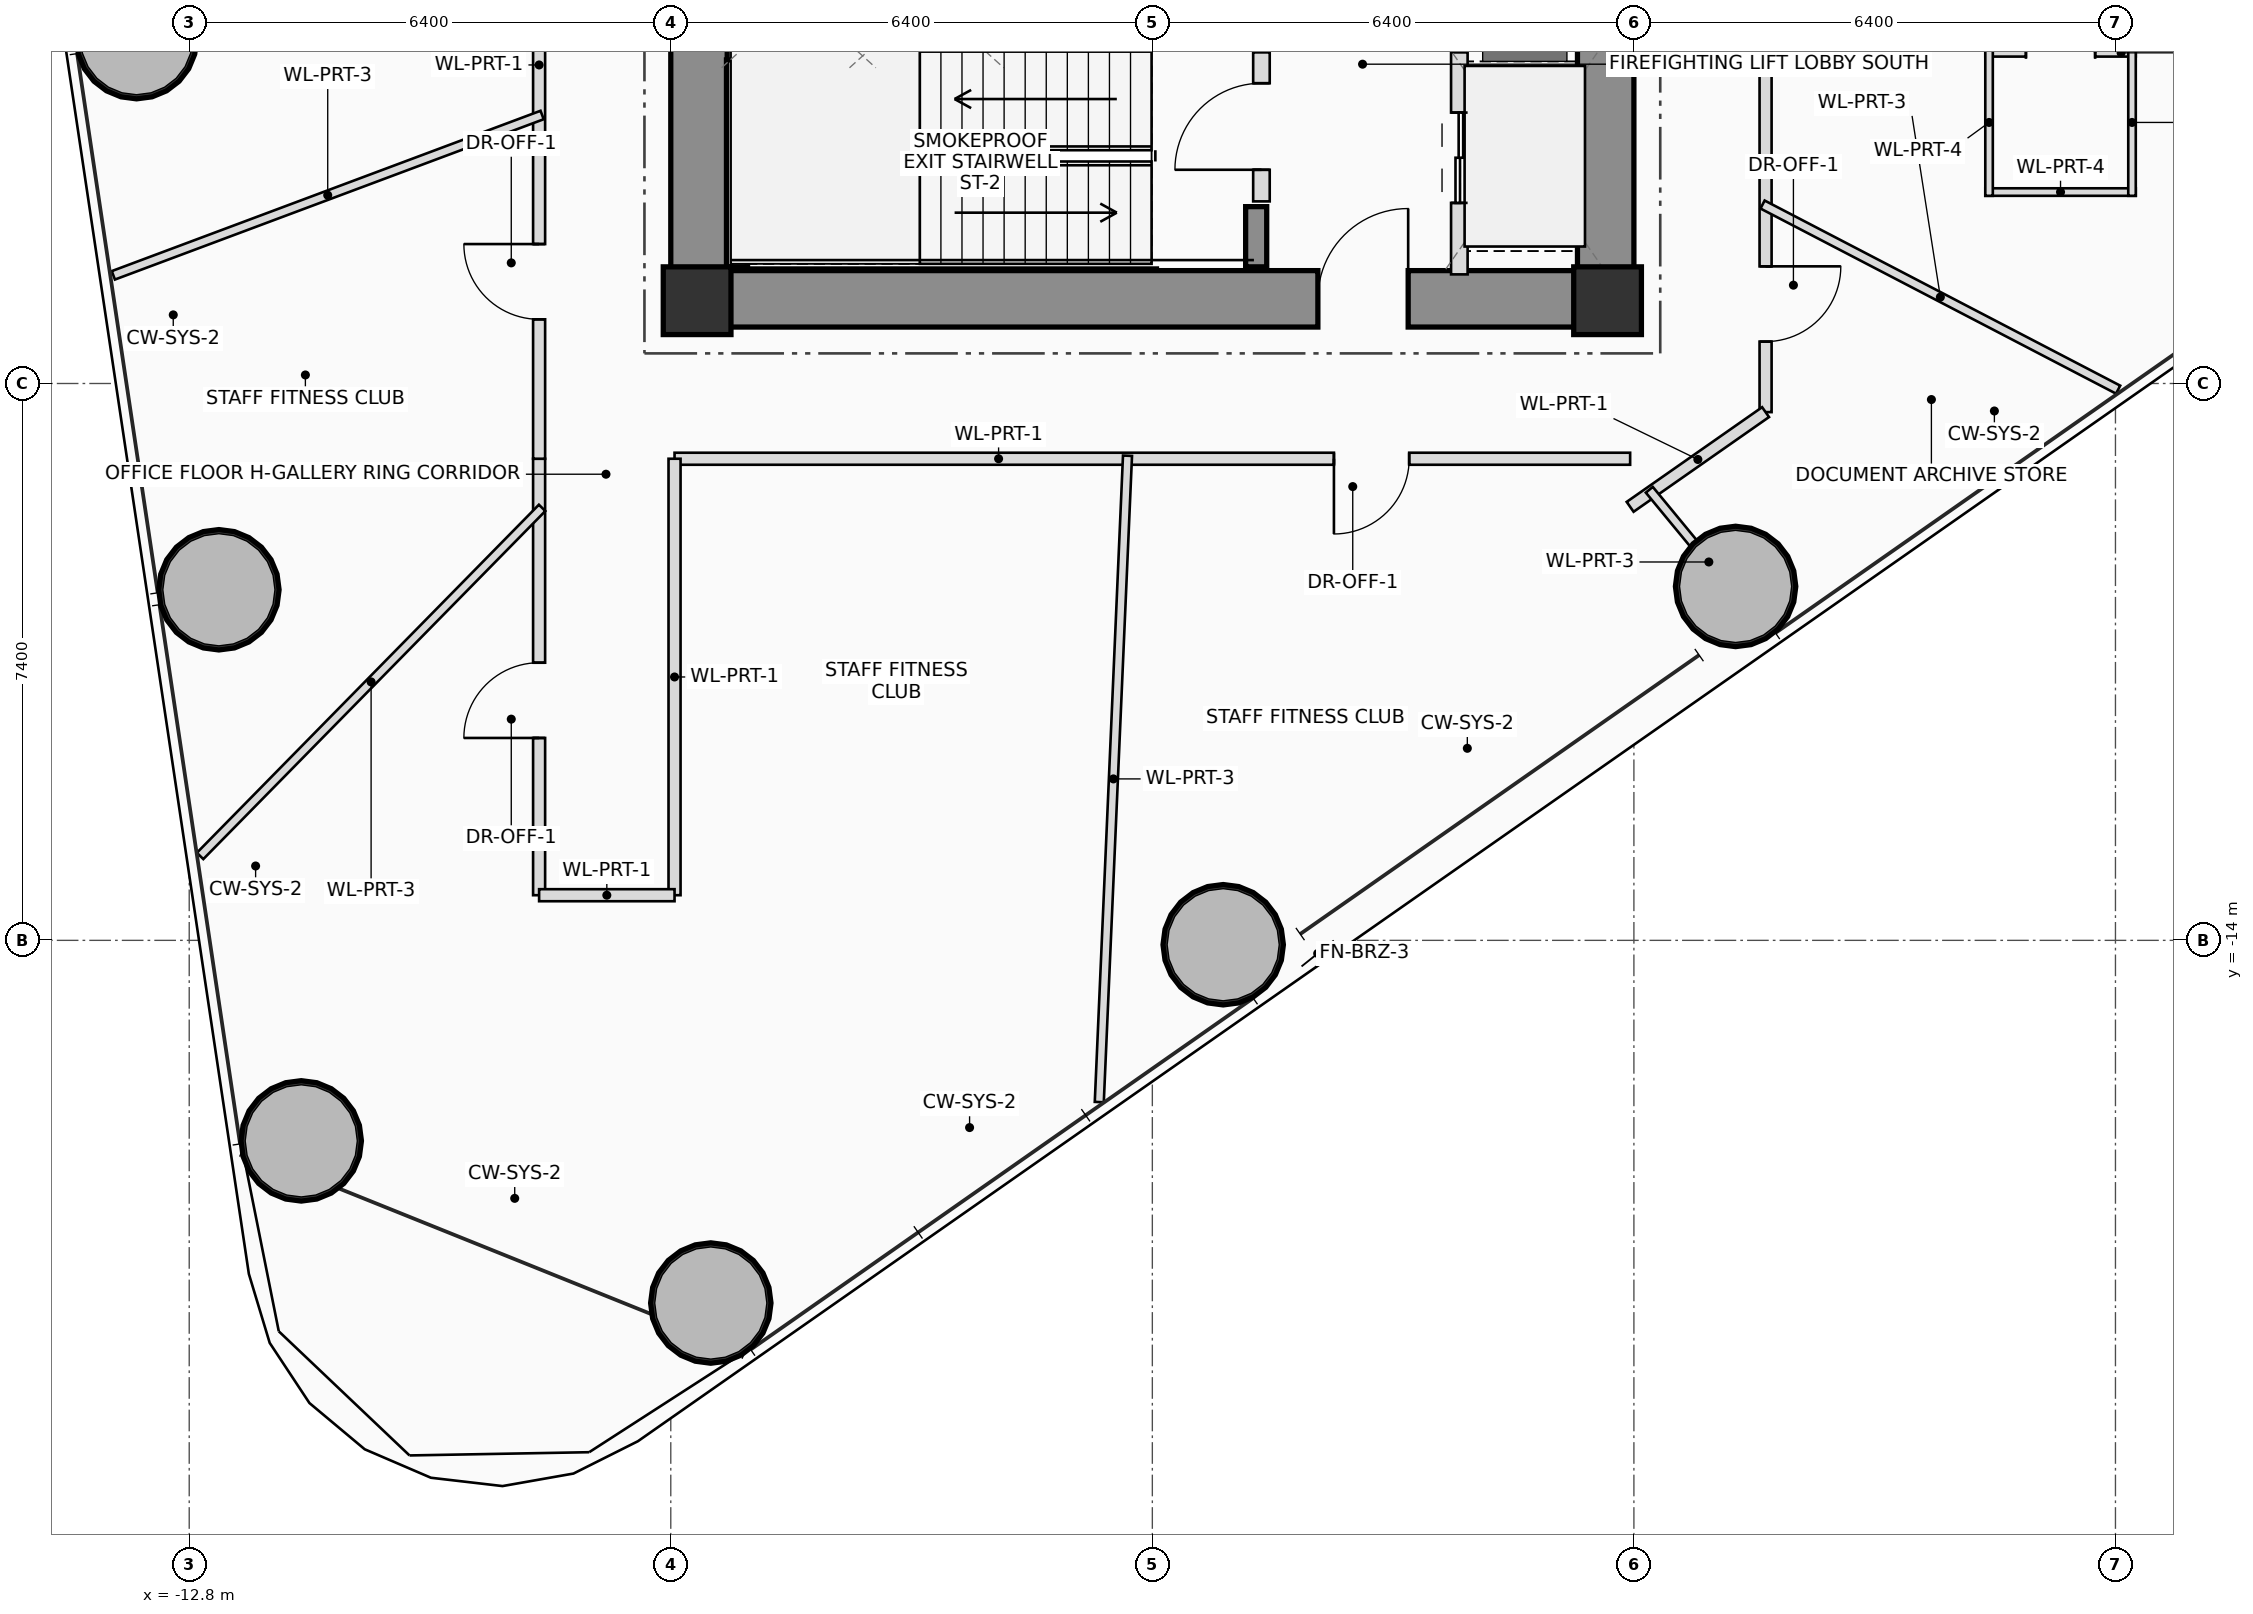
"""IFC4 building model, lengths in metres.
Left out: names, types, materials, properties, quantities, classifications, styles, units other than length and angle.
Written with IfcOpenShell. Run it as: python <this file> out.ifc"""

import sys

from ifc_helpers import new_model, si_unit, direction, frame, frame_2d, origin, origin_2d, place, context, subcontext, project, spatial, rectangle, hollow_circle, extrude, source, transform, mapped, element, fill, save


model = new_model("IFC4")
c1 = context("Model", 3, precision=1e-05, world=origin(), true_north=direction((0.0, 1.0)))
c2 = subcontext(c1, "Body", "Model", "MODEL_VIEW")
j1 = project(units=[si_unit("LENGTHUNIT", "METRE"), si_unit("PLANEANGLEUNIT", "RADIAN")], contexts=[c1])
p1 = place(None, origin())
s1 = spatial("IfcSite", under=j1, at=p1, CompositionType="ELEMENT")
p2 = place(p1, origin())
s2 = spatial("IfcBuilding", under=s1, at=p2, CompositionType="ELEMENT")
p3 = place(p2, frame((0.0, 0.0, 77.3)))
s3 = spatial("IfcBuildingStorey", under=s2, at=p3, CompositionType="ELEMENT", Elevation=77.3)
m1 = source(origin(), c2, "Body", "SweptSolid", [
    extrude(rectangle(XDim=0.9, YDim=0.9, at=origin_2d()), origin(), (0.0, 0.0, 1.0), 3.75),
])
for number, where, z_axis, x_axis in (
    (1, (-6.05, -5.5, 0.0), (0.0, 0.0, 1.0), (1.0, 0.0, 0.0)),
    (2, (6.05, -5.5, 0.0), (0.0, 0.0, 1.0), (1.0, 0.0, 0.0)),
):
    element("IfcColumn", number, at=place(p3, frame(where, z_axis=z_axis, x_axis=x_axis)), inside=s3, PredefinedType="COLUMN", context=c2, shape_type="MappedRepresentation", body=[
        mapped(m1, transform((0.0, 0.0, 0.0), scale=1.0)),
    ])
p4 = place(p3, frame((-6.4, -5.475, 0.0), z_axis=(0.0, 0.0, 1.0), x_axis=(1.0, 0.0, 0.0)))
e3 = element("IfcWall", 3, at=p4, inside=s3, PredefinedType="SHEAR", context=c2, shape_type="SweptSolid", body=[
    extrude(rectangle(XDim=12.8, YDim=0.75, at=frame_2d((6.4, 0.0))), origin(), (0.0, 0.0, 1.0), 3.75),
])
p5 = place(p4, frame((8.6, 0.0, 0.0)))
e4 = element("IfcOpeningElement", 4, at=p5, cuts=e3, PredefinedType="OPENING", context=c2, shape_type="SweptSolid", body=[
    extrude(rectangle(XDim=1.2, YDim=2.2, at=frame_2d((0.6, 1.1))), frame((0.0, 0.385, 0.0), z_axis=(0.0, -1.0, 0.0), x_axis=(1.0, 0.0, 0.0)), (0.0, 0.0, 1.0), 0.77),
])
p6 = place(p3, frame((6.025, -5.1, 0.0), z_axis=(0.0, 0.0, 1.0), x_axis=(0.0, 1.0, 0.0)))
e5 = element("IfcWall", 5, at=p6, inside=s3, PredefinedType="SHEAR", context=c2, shape_type="SweptSolid", body=[
    extrude(rectangle(XDim=10.2, YDim=0.75, at=frame_2d((5.1, 0.0))), origin(), (0.0, 0.0, 1.0), 3.75),
])
p7 = place(p3, frame((-6.025, -5.1, 0.0), z_axis=(0.0, 0.0, 1.0), x_axis=(0.0, 1.0, 0.0)))
e6 = element("IfcWall", 6, at=p7, inside=s3, PredefinedType="SHEAR", context=c2, shape_type="SweptSolid", body=[
    extrude(rectangle(XDim=3.35, YDim=0.75, at=frame_2d((1.675, 0.0))), origin(), (0.0, 0.0, 1.0), 3.75),
])
p8 = place(p3, frame((-5.52, -5.05, 0.0), z_axis=(0.0, 0.0, 1.0), x_axis=(0.0, 1.0, 0.0)))
e7 = element("IfcWall", 7, at=p8, inside=s3, PredefinedType="SHEAR", context=c2, shape_type="SweptSolid", body=[
    extrude(rectangle(XDim=2.75, YDim=0.28, at=frame_2d((1.375, 0.0))), origin(), (0.0, 0.0, 1.0), 3.75),
])
p9 = place(p3, frame((1.38, -5.05, 0.0), z_axis=(0.0, 0.0, 1.0), x_axis=(0.0, 1.0, 0.0)))
e8 = element("IfcWall", 8, at=p9, inside=s3, PredefinedType="SHEAR", context=c2, shape_type="SweptSolid", body=[
    extrude(rectangle(XDim=0.8, YDim=0.28, at=frame_2d((0.4, 0.0))), origin(), (0.0, 0.0, 1.0), 3.75),
])
m2 = source(origin(), c2, "Body", "SweptSolid", [
    extrude(hollow_circle(Radius=0.8, WallThickness=0.055, at=origin_2d()), origin(), (0.0, 0.0, 1.0), 3.75),
])
for number, where, z_axis, x_axis in (
    (9, (-5.868, -18.819, 0.0), (0.0, 0.0, 1.0), (1.0, 0.0, 0.0)),
    (10, (0.942, -14.058, 0.0), (0.0, 0.0, 1.0), (1.0, 0.0, 0.0)),
    (11, (7.752, -9.297, 0.0), (0.0, 0.0, 1.0), (1.0, 0.0, 0.0)),
    (12, (-13.5, -2.018, 0.0), (0.0, 0.0, 1.0), (1.0, 0.0, 0.0)),
    (13, (-12.406, -9.341, 0.0), (0.0, 0.0, 1.0), (1.0, 0.0, 0.0)),
    (14, (-11.311, -16.665, 0.0), (0.0, 0.0, 1.0), (1.0, 0.0, 0.0)),
):
    element("IfcColumn", number, at=place(p3, frame(where, z_axis=z_axis, x_axis=x_axis)), inside=s3, PredefinedType="COLUMN", context=c2, shape_type="MappedRepresentation", body=[
        mapped(m2, transform((0.0, 0.0, 0.0), scale=1.0)),
    ])
p10 = place(p3, frame((1.45, -4.18, 0.0), z_axis=(0.0, 0.0, 1.0), x_axis=(0.0, 1.0, 0.0)))
e15 = element("IfcWall", 15, at=p10, inside=s3, PredefinedType="PLUMBINGWALL", context=c2, shape_type="SweptSolid", body=[
    extrude(rectangle(XDim=1.98, YDim=0.22, at=frame_2d((0.99, 0.0))), origin(), (0.0, 0.0, 1.0), 3.545),
])
p11 = place(p10, frame((0.42, 0.0, 0.0)))
e16 = element("IfcOpeningElement", 16, at=p11, cuts=e15, PredefinedType="OPENING", context=c2, shape_type="SweptSolid", body=[
    extrude(rectangle(XDim=1.15, YDim=2.15, at=frame_2d((0.575, 1.075))), frame((0.0, 0.12, 0.0), z_axis=(0.0, -1.0, 0.0), x_axis=(1.0, 0.0, 0.0)), (0.0, 0.0, 1.0), 0.24),
])
p12 = place(p3, frame((4.08, -5.15, 0.0), z_axis=(0.0, 0.0, 1.0), x_axis=(0.0, 1.0, 0.0)))
e17 = element("IfcWall", 17, at=p12, inside=s3, PredefinedType="PLUMBINGWALL", context=c2, shape_type="SweptSolid", body=[
    extrude(rectangle(XDim=2.95, YDim=0.22, at=frame_2d((1.475, 0.0))), origin(), (0.0, 0.0, 1.0), 3.545),
])
p13 = place(p12, frame((0.95, 0.0, 0.0)))
e18 = element("IfcOpeningElement", 18, at=p13, cuts=e17, PredefinedType="OPENING", context=c2, shape_type="SweptSolid", body=[
    extrude(rectangle(XDim=1.2, YDim=2.25, at=frame_2d((0.6, 1.125))), frame((0.0, 0.12, 0.0), z_axis=(0.0, -1.0, 0.0), x_axis=(1.0, 0.0, 0.0)), (0.0, 0.0, 1.0), 0.24),
])
p14 = place(p3, frame((11.07, -2.206, 0.0), z_axis=(0.0, 0.0, 1.0), x_axis=(1.0, 0.0, 0.0)))
e19 = element("IfcWall", 19, at=p14, inside=s3, PredefinedType="PARTITIONING", context=c2, shape_type="SweptSolid", body=[
    extrude(rectangle(XDim=2.0, YDim=0.1, at=frame_2d((1.0, 0.0))), origin(), (0.0, 0.0, 1.0), 3.545),
])
p15 = place(p14, frame((0.54, 0.0, 0.0)))
e20 = element("IfcOpeningElement", 20, at=p15, cuts=e19, PredefinedType="OPENING", context=c2, shape_type="SweptSolid", body=[
    extrude(rectangle(XDim=0.92, YDim=2.1, at=frame_2d((0.46, 1.05))), frame((0.0, 0.06, 0.0), z_axis=(0.0, -1.0, 0.0), x_axis=(1.0, 0.0, 0.0)), (0.0, 0.0, 1.0), 0.12),
])
p16 = place(p3, frame((13.07, -4.056, 0.0), z_axis=(0.0, 0.0, 1.0), x_axis=(-1.0, 0.0, 0.0)))
e21 = element("IfcWall", 21, at=p16, inside=s3, PredefinedType="PARTITIONING", context=c2, shape_type="SweptSolid", body=[
    extrude(rectangle(XDim=2.0, YDim=0.1, at=frame_2d((1.0, 0.0))), origin(), (0.0, 0.0, 1.0), 3.545),
])
for number, where, z_axis, x_axis in (
    (22, (13.02, -2.156, 0.0), (0.0, 0.0, 1.0), (0.0, -1.0, 0.0)),
    (23, (11.12, -4.106, 0.0), (0.0, 0.0, 1.0), (0.0, 1.0, 0.0)),
):
    element("IfcWall", number, at=place(p3, frame(where, z_axis=z_axis, x_axis=x_axis)), inside=s3, PredefinedType="PARTITIONING", context=c2, shape_type="SweptSolid", body=[
        extrude(rectangle(XDim=1.95, YDim=0.1, at=frame_2d((0.975, 0.0))), origin(), (0.0, 0.0, 1.0), 2.85),
    ])
p17 = place(p3, frame((-8.15, -13.4, 0.0), z_axis=(0.0, 0.0, 1.0), x_axis=(0.0, 1.0, 0.0)))
e24 = element("IfcWall", 24, at=p17, inside=s3, PredefinedType="PARTITIONING", context=c2, shape_type="SweptSolid", body=[
    extrude(rectangle(XDim=5.8, YDim=0.16, at=frame_2d((2.9, 0.0))), origin(), (0.0, 0.0, 1.0), 2.85),
])
p18 = place(p17, frame((2.09, 0.0, 0.0)))
e25 = element("IfcOpeningElement", 25, at=p18, cuts=e24, PredefinedType="OPENING", context=c2, shape_type="SweptSolid", body=[
    extrude(rectangle(XDim=1.0, YDim=2.25, at=frame_2d((0.5, 1.125))), frame((0.0, 0.09, 0.0), z_axis=(0.0, -1.0, 0.0), x_axis=(1.0, 0.0, 0.0)), (0.0, 0.0, 1.0), 0.18),
])
p19 = place(p3, frame((-8.15, -7.6, 0.0), z_axis=(0.0, 0.0, 1.0), x_axis=(0.0, 1.0, 0.0)))
e26 = element("IfcWall", 26, at=p19, inside=s3, PredefinedType="PARTITIONING", context=c2, shape_type="SweptSolid", body=[
    extrude(rectangle(XDim=15.2, YDim=0.16, at=frame_2d((7.6, 0.0))), origin(), (0.0, 0.0, 1.0), 2.85),
])
p20 = place(p19, frame((1.853, 0.0, 0.0)))
e27 = element("IfcOpeningElement", 27, at=p20, cuts=e26, PredefinedType="OPENING", context=c2, shape_type="SweptSolid", body=[
    extrude(rectangle(XDim=1.0, YDim=2.25, at=frame_2d((0.5, 1.125))), frame((0.0, 0.09, 0.0), z_axis=(0.0, -1.0, 0.0), x_axis=(1.0, 0.0, 0.0)), (0.0, 0.0, 1.0), 0.18),
])
p21 = place(p19, frame((7.613, 0.0, 0.0)))
e28 = element("IfcOpeningElement", 28, at=p21, cuts=e26, PredefinedType="OPENING", context=c2, shape_type="SweptSolid", body=[
    extrude(rectangle(XDim=1.0, YDim=2.25, at=frame_2d((0.5, 1.125))), frame((0.0, 0.09, 0.0), z_axis=(0.0, -1.0, 0.0), x_axis=(1.0, 0.0, 0.0)), (0.0, 0.0, 1.0), 0.18),
])
p22 = place(p19, frame((12.862, 0.0, 0.0)))
e29 = element("IfcOpeningElement", 29, at=p22, cuts=e26, PredefinedType="OPENING", context=c2, shape_type="SweptSolid", body=[
    extrude(rectangle(XDim=1.0, YDim=2.25, at=frame_2d((0.5, 1.125))), frame((0.0, 0.09, 0.0), z_axis=(0.0, -1.0, 0.0), x_axis=(1.0, 0.0, 0.0)), (0.0, 0.0, 1.0), 0.18),
])
p23 = place(p3, frame((8.15, -0.02, 0.0), z_axis=(0.0, 0.0, 1.0), x_axis=(0.0, -1.0, 0.0)))
e30 = element("IfcWall", 30, at=p23, inside=s3, PredefinedType="PARTITIONING", context=c2, shape_type="SweptSolid", body=[
    extrude(rectangle(XDim=6.96, YDim=0.16, at=frame_2d((3.48, 0.0))), origin(), (0.0, 0.0, 1.0), 2.85),
])
p24 = place(p23, frame((5.023, 0.0, 0.0)))
e31 = element("IfcOpeningElement", 31, at=p24, cuts=e30, PredefinedType="OPENING", context=c2, shape_type="SweptSolid", body=[
    extrude(rectangle(XDim=1.0, YDim=2.25, at=frame_2d((0.5, 1.125))), frame((0.0, 0.09, 0.0), z_axis=(0.0, -1.0, 0.0), x_axis=(1.0, 0.0, 0.0)), (0.0, 0.0, 1.0), 0.18),
])
p25 = place(p3, frame((8.15, -6.98, 0.0), z_axis=(0.0, 0.0, 1.0), x_axis=(-0.819513839239, -0.573059392468, 0.0)))
e32 = element("IfcWall", 32, at=p25, inside=s3, PredefinedType="PARTITIONING", context=c2, shape_type="SweptSolid", body=[
    extrude(rectangle(XDim=2.196, YDim=0.16, at=frame_2d((1.098, 0.0))), origin(), (0.0, 0.0, 1.0), 2.85),
])
p26 = place(p3, frame((6.35, -7.6, 0.0), z_axis=(0.0, 0.0, 1.0), x_axis=(-1.0, 0.0, 0.0)))
e33 = element("IfcWall", 33, at=p26, inside=s3, PredefinedType="PARTITIONING", context=c2, shape_type="SweptSolid", body=[
    extrude(rectangle(XDim=12.7, YDim=0.16, at=frame_2d((6.35, 0.0))), origin(), (0.0, 0.0, 1.0), 2.85),
])
p27 = place(p26, frame((2.937, 0.0, 0.0)))
e34 = element("IfcOpeningElement", 34, at=p27, cuts=e33, PredefinedType="OPENING", context=c2, shape_type="SweptSolid", body=[
    extrude(rectangle(XDim=1.0, YDim=2.25, at=frame_2d((0.5, 1.125))), frame((0.0, 0.09, 0.0), z_axis=(0.0, -1.0, 0.0), x_axis=(1.0, 0.0, 0.0)), (0.0, 0.0, 1.0), 0.18),
])
p28 = place(p3, frame((-6.35, -7.6, 0.0), z_axis=(0.0, 0.0, 1.0), x_axis=(0.0, -1.0, 0.0)))
e35 = element("IfcWall", 35, at=p28, inside=s3, PredefinedType="PARTITIONING", context=c2, shape_type="SweptSolid", body=[
    extrude(rectangle(XDim=5.8, YDim=0.16, at=frame_2d((2.9, 0.0))), origin(), (0.0, 0.0, 1.0), 3.05),
])
p29 = place(p3, frame((-6.35, -13.4, 0.0), z_axis=(0.0, 0.0, 1.0), x_axis=(-1.0, 0.0, 0.0)))
e36 = element("IfcWall", 36, at=p29, inside=s3, PredefinedType="PARTITIONING", context=c2, shape_type="SweptSolid", body=[
    extrude(rectangle(XDim=1.8, YDim=0.16, at=frame_2d((0.9, 0.0))), origin(), (0.0, 0.0, 1.0), 3.545),
])
p30 = place(p3, frame((-8.11, -3.032, 0.0), z_axis=(0.0, 0.0, 1.0), x_axis=(-0.936670113357, -0.350212933433, 0.0)))
e37 = element("IfcWall", 37, at=p30, inside=s3, PredefinedType="PARTITIONING", context=c2, shape_type="SweptSolid", body=[
    extrude(rectangle(XDim=6.084, YDim=0.12, at=frame_2d((3.042, 0.0))), origin(), (0.0, 0.0, 1.0), 2.85),
])
p31 = place(p3, frame((-8.11, -8.253, 0.0), z_axis=(0.0, 0.0, 1.0), x_axis=(-0.700886951804, -0.713272374897, 0.0)))
e38 = element("IfcWall", 38, at=p31, inside=s3, PredefinedType="PARTITIONING", context=c2, shape_type="SweptSolid", body=[
    extrude(rectangle(XDim=6.485, YDim=0.12, at=frame_2d((3.243, 0.0))), origin(), (0.0, 0.0, 1.0), 3.01),
])
p32 = place(p3, frame((-0.33, -7.56, 0.0), z_axis=(0.0, 0.0, 1.0), x_axis=(-0.043619614926, -0.999048211646, 0.0)))
e39 = element("IfcWall", 39, at=p32, inside=s3, PredefinedType="PARTITIONING", context=c2, shape_type="SweptSolid", body=[
    extrude(rectangle(XDim=8.597, YDim=0.12, at=frame_2d((4.299, 0.0))), origin(), (0.0, 0.0, 1.0), 3.01),
])
p33 = place(p3, frame((6.605, -8.012, 0.0), z_axis=(0.0, 0.0, 1.0), x_axis=(0.636033986145, -0.771661045064, 0.0)))
e40 = element("IfcWall", 40, at=p33, inside=s3, PredefinedType="PARTITIONING", context=c2, shape_type="SweptSolid", body=[
    extrude(rectangle(XDim=2.488, YDim=0.12, at=frame_2d((1.244, 0.0))), origin(), (0.0, 0.0, 1.0), 3.545),
])
p34 = place(p3, frame((8.11, -4.222, 0.0), z_axis=(0.0, 0.0, 1.0), x_axis=(0.886984089822, -0.461799983112, 0.0)))
e41 = element("IfcWall", 41, at=p34, inside=s3, PredefinedType="PARTITIONING", context=c2, shape_type="SweptSolid", body=[
    extrude(rectangle(XDim=5.327, YDim=0.12, at=frame_2d((2.664, 0.0))), origin(), (0.0, 0.0, 1.0), 2.85),
])
p35 = place(p5, origin())
e42 = element("IfcDoor", 42, at=p35, inside=s3, OperationType="SINGLE_SWING_RIGHT", PredefinedType="DOOR", context=c2, shape_type="SweptSolid", body=[
    extrude(rectangle(XDim=1.2, YDim=2.2, at=frame_2d((0.6, 1.1))), frame((0.0, 0.025, 0.0), z_axis=(0.0, -1.0, 0.0), x_axis=(1.0, 0.0, 0.0)), (0.0, 0.0, 1.0), 0.05),
])
fill(e4, e42)
p36 = place(p11, origin())
e43 = element("IfcDoor", 43, at=p36, inside=s3, OperationType="SINGLE_SWING_LEFT", PredefinedType="DOOR", context=c2, shape_type="SweptSolid", body=[
    extrude(rectangle(XDim=1.15, YDim=2.15, at=frame_2d((0.575, 1.075))), frame((0.0, 0.025, 0.0), z_axis=(0.0, -1.0, 0.0), x_axis=(1.0, 0.0, 0.0)), (0.0, 0.0, 1.0), 0.05),
])
fill(e16, e43)
p37 = place(p13, origin())
e44 = element("IfcDoor", 44, at=p37, inside=s3, OperationType="DOUBLE_DOOR_SLIDING", PredefinedType="DOOR", context=c2, shape_type="SweptSolid", body=[
    extrude(rectangle(XDim=1.2, YDim=2.25, at=frame_2d((0.6, 1.125))), frame((0.0, 0.025, 0.0), z_axis=(0.0, -1.0, 0.0), x_axis=(1.0, 0.0, 0.0)), (0.0, 0.0, 1.0), 0.05),
])
fill(e18, e44)
p38 = place(p15, origin())
e45 = element("IfcDoor", 45, at=p38, inside=s3, OperationType="SINGLE_SWING_RIGHT", PredefinedType="DOOR", context=c2, shape_type="SweptSolid", body=[
    extrude(rectangle(XDim=0.92, YDim=2.1, at=frame_2d((0.46, 1.05))), frame((0.0, 0.025, 0.0), z_axis=(0.0, -1.0, 0.0), x_axis=(1.0, 0.0, 0.0)), (0.0, 0.0, 1.0), 0.05),
])
fill(e20, e45)
p39 = place(p18, origin())
e46 = element("IfcDoor", 46, at=p39, inside=s3, OperationType="SINGLE_SWING_LEFT", PredefinedType="DOOR", context=c2, shape_type="SweptSolid", body=[
    extrude(rectangle(XDim=1.0, YDim=2.25, at=frame_2d((0.5, 1.125))), frame((0.0, 0.025, 0.0), z_axis=(0.0, -1.0, 0.0), x_axis=(1.0, 0.0, 0.0)), (0.0, 0.0, 1.0), 0.05),
])
fill(e25, e46)
p40 = place(p20, origin())
e47 = element("IfcDoor", 47, at=p40, inside=s3, OperationType="SINGLE_SWING_RIGHT", PredefinedType="DOOR", context=c2, shape_type="SweptSolid", body=[
    extrude(rectangle(XDim=1.0, YDim=2.25, at=frame_2d((0.5, 1.125))), frame((0.0, 0.025, 0.0), z_axis=(0.0, -1.0, 0.0), x_axis=(1.0, 0.0, 0.0)), (0.0, 0.0, 1.0), 0.05),
])
fill(e27, e47)
p41 = place(p24, origin())
e48 = element("IfcDoor", 48, at=p41, inside=s3, OperationType="SINGLE_SWING_LEFT", PredefinedType="DOOR", context=c2, shape_type="SweptSolid", body=[
    extrude(rectangle(XDim=1.0, YDim=2.25, at=frame_2d((0.5, 1.125))), frame((0.0, 0.025, 0.0), z_axis=(0.0, -1.0, 0.0), x_axis=(1.0, 0.0, 0.0)), (0.0, 0.0, 1.0), 0.05),
])
fill(e31, e48)
p42 = place(p27, origin())
e49 = element("IfcDoor", 49, at=p42, inside=s3, OperationType="SINGLE_SWING_RIGHT", PredefinedType="DOOR", context=c2, shape_type="SweptSolid", body=[
    extrude(rectangle(XDim=1.0, YDim=2.25, at=frame_2d((0.5, 1.125))), frame((0.0, 0.025, 0.0), z_axis=(0.0, -1.0, 0.0), x_axis=(1.0, 0.0, 0.0)), (0.0, 0.0, 1.0), 0.05),
])
fill(e34, e49)
save(model, sys.argv[1])
